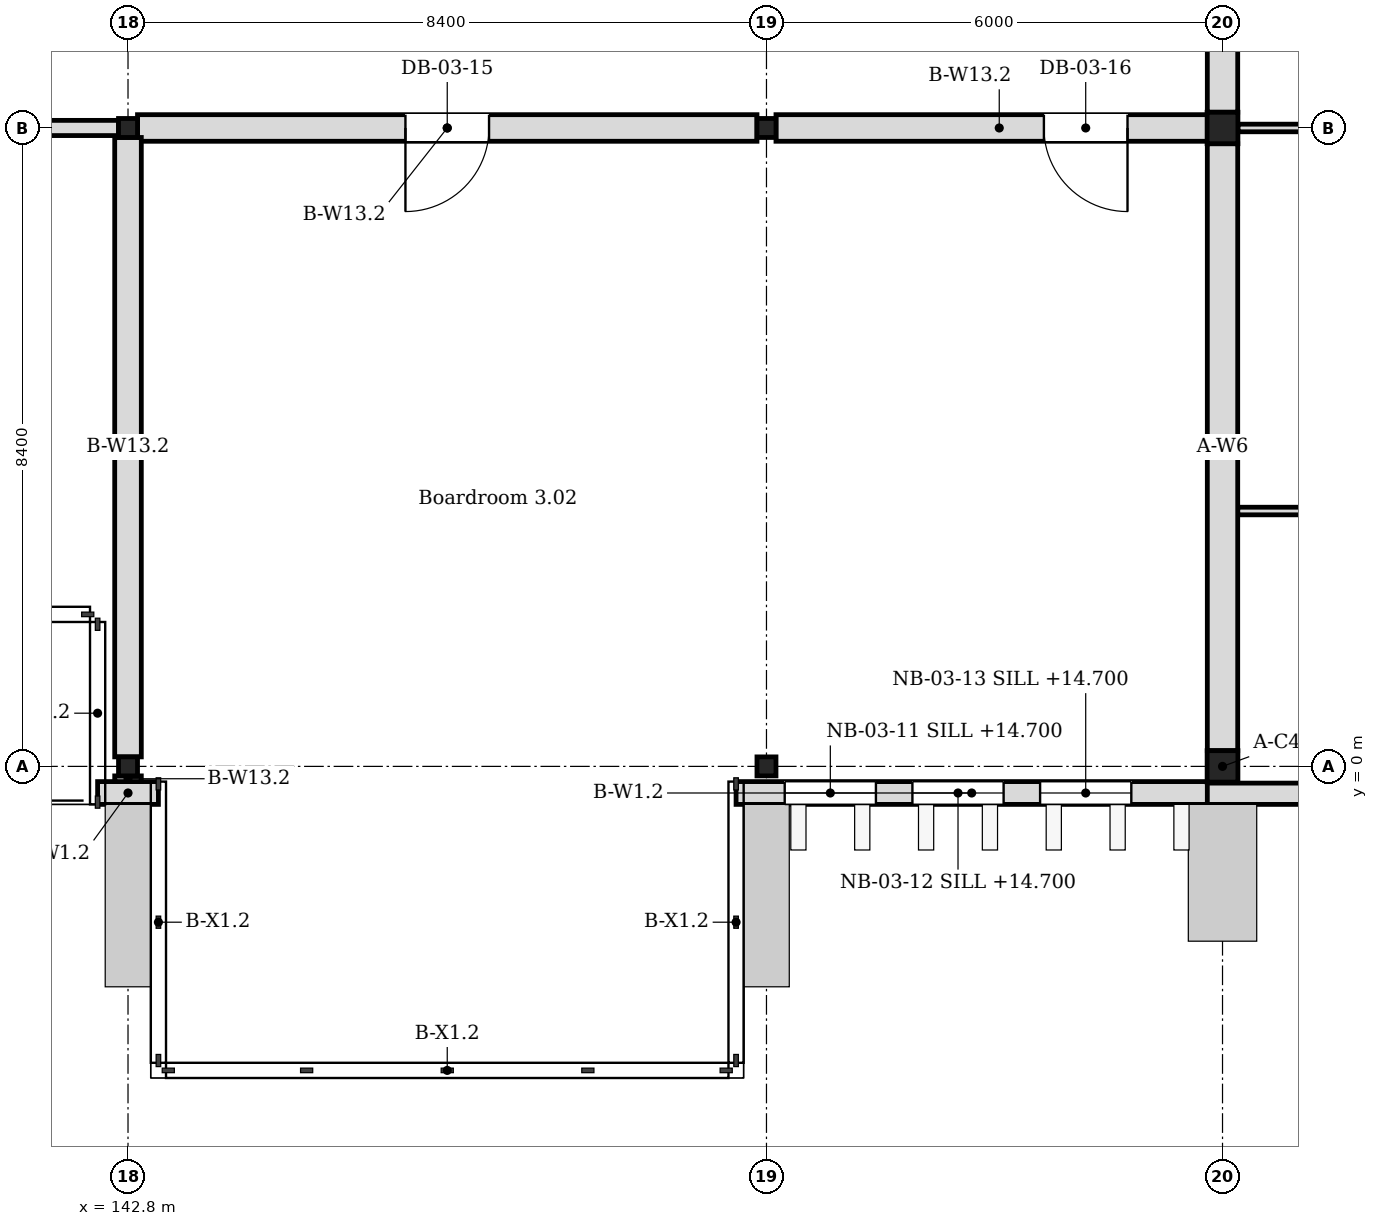
"""IFC4 building model, lengths in metres.
Left out: names, types, materials, properties, quantities, classifications, styles, units other than length and angle.
Written with IfcOpenShell. Run it as: python <this file> out.ifc"""

import sys

from ifc_helpers import new_model, si_unit, direction, frame, frame_2d, origin, origin_2d, place, context, subcontext, project, spatial, rectangle, i_section, extrude, element, fill, save


model = new_model("IFC4")
c1 = context("Model", 3, precision=1e-05, world=origin(), true_north=direction((0.0, 1.0)))
c2 = subcontext(c1, "Body", "Model", "MODEL_VIEW")
j1 = project(units=[si_unit("LENGTHUNIT", "METRE"), si_unit("PLANEANGLEUNIT", "RADIAN")], contexts=[c1])
p1 = place(None, origin())
s1 = spatial("IfcSite", under=j1, at=p1, CompositionType="ELEMENT")
p2 = place(p1, origin())
s2 = spatial("IfcBuilding", under=s1, at=p2, CompositionType="ELEMENT")
p3 = place(p2, frame((0.0, 0.0, 14.4)))
s3 = spatial("IfcBuildingStorey", under=s2, at=p3, CompositionType="ELEMENT", Elevation=14.4)
for number, where, z_axis, x_axis in (
    (1, (157.2, 0.0, 0.0), (0.0, 0.0, 1.0), (1.0, 0.0, 0.0)),
    (2, (157.2, 8.4, 0.0), (0.0, 0.0, 1.0), (1.0, 0.0, 0.0)),
):
    element("IfcColumn", number, at=place(p3, frame(where, z_axis=z_axis, x_axis=x_axis)), inside=s3, PredefinedType="COLUMN", context=c2, shape_type="SweptSolid", body=[
        extrude(i_section(OverallWidth=0.405, OverallDepth=0.414, WebThickness=0.018, FlangeThickness=0.028, FilletRadius=0.022, at=origin_2d()), origin(), (0.0, 0.0, 1.0), 4.2),
    ])
for number, where, z_axis, x_axis in (
    (3, (142.8, 0.0, 0.0), (0.0, 0.0, 1.0), (1.0, 0.0, 0.0)),
    (4, (142.8, 8.4, 0.0), (0.0, 0.0, 1.0), (1.0, 0.0, 0.0)),
    (5, (151.2, 0.0, 0.0), (0.0, 0.0, 1.0), (1.0, 0.0, 0.0)),
    (6, (151.2, 8.4, 0.0), (0.0, 0.0, 1.0), (1.0, 0.0, 0.0)),
):
    element("IfcColumn", number, at=place(p3, frame(where, z_axis=z_axis, x_axis=x_axis)), inside=s3, PredefinedType="COLUMN", context=c2, shape_type="SweptSolid", body=[
        extrude(i_section(OverallWidth=0.25, OverallDepth=0.25, WebThickness=0.009, FlangeThickness=0.014, FilletRadius=0.013, at=origin_2d()), origin(), (0.0, 0.0, 1.0), 3.95),
    ])
p4 = place(p3, frame((156.7, -0.36, 0.0), z_axis=(0.0, 0.0, 1.0), x_axis=(1.0, 0.0, 0.0)))
e7 = element("IfcWall", 7, at=p4, inside=s3, PredefinedType="SOLIDWALL", context=c2, shape_type="SweptSolid", body=[
    extrude(rectangle(XDim=20.2, YDim=0.28, at=frame_2d((10.1, 0.0))), origin(), (0.0, 0.0, 1.0), 4.05),
])
p5 = place(p4, frame((9.26, 0.0, 0.6)))
e8 = element("IfcOpeningElement", 8, at=p5, cuts=e7, PredefinedType="OPENING", context=c2, shape_type="SweptSolid", body=[
    extrude(rectangle(XDim=1.68, YDim=2.4, at=frame_2d((0.84, 1.2))), frame((0.0, 0.15, 0.0), z_axis=(0.0, -1.0, 0.0), x_axis=(1.0, 0.0, 0.0)), (0.0, 0.0, 1.0), 0.3),
])
p6 = place(p4, frame((3.34, 0.0, 0.6)))
e9 = element("IfcOpeningElement", 9, at=p6, cuts=e7, PredefinedType="OPENING", context=c2, shape_type="SweptSolid", body=[
    extrude(rectangle(XDim=2.52, YDim=2.4, at=frame_2d((1.26, 1.2))), frame((0.0, 0.15, 0.0), z_axis=(0.0, -1.0, 0.0), x_axis=(1.0, 0.0, 0.0)), (0.0, 0.0, 1.0), 0.3),
])
p7 = place(p3, frame((142.4, -0.35, 0.0), z_axis=(0.0, 0.0, 1.0), x_axis=(1.0, 0.0, 0.0)))
e10 = element("IfcWall", 10, at=p7, inside=s3, PredefinedType="SOLIDWALL", context=c2, shape_type="SweptSolid", body=[
    extrude(rectangle(XDim=0.8, YDim=0.3, at=frame_2d((0.4, 0.0))), origin(), (0.0, 0.0, 1.0), 3.95),
])
p8 = place(p3, frame((150.8, -0.35, 0.0), z_axis=(0.0, 0.0, 1.0), x_axis=(1.0, 0.0, 0.0)))
e11 = element("IfcWall", 11, at=p8, inside=s3, PredefinedType="SOLIDWALL", context=c2, shape_type="SweptSolid", body=[
    extrude(rectangle(XDim=6.2, YDim=0.3, at=frame_2d((3.1, 0.0))), origin(), (0.0, 0.0, 1.0), 3.95),
])
p9 = place(p8, frame((0.64, 0.0, 0.3)))
e12 = element("IfcOpeningElement", 12, at=p9, cuts=e11, PredefinedType="OPENING", context=c2, shape_type="SweptSolid", body=[
    extrude(rectangle(XDim=1.2, YDim=3.3, at=frame_2d((0.6, 1.65))), frame((0.0, 0.16, 0.0), z_axis=(0.0, -1.0, 0.0), x_axis=(1.0, 0.0, 0.0)), (0.0, 0.0, 1.0), 0.32),
])
p10 = place(p8, frame((2.32, 0.0, 0.3)))
e13 = element("IfcOpeningElement", 13, at=p10, cuts=e11, PredefinedType="OPENING", context=c2, shape_type="SweptSolid", body=[
    extrude(rectangle(XDim=1.2, YDim=3.3, at=frame_2d((0.6, 1.65))), frame((0.0, 0.16, 0.0), z_axis=(0.0, -1.0, 0.0), x_axis=(1.0, 0.0, 0.0)), (0.0, 0.0, 1.0), 0.32),
])
p11 = place(p8, frame((4.0, 0.0, 0.3)))
e14 = element("IfcOpeningElement", 14, at=p11, cuts=e11, PredefinedType="OPENING", context=c2, shape_type="SweptSolid", body=[
    extrude(rectangle(XDim=1.2, YDim=3.3, at=frame_2d((0.6, 1.65))), frame((0.0, 0.16, 0.0), z_axis=(0.0, -1.0, 0.0), x_axis=(1.0, 0.0, 0.0)), (0.0, 0.0, 1.0), 0.32),
])
p12 = place(p3, frame((157.403, 8.4, 0.0), z_axis=(0.0, 0.0, 1.0), x_axis=(1.0, 0.0, 0.0)))
e15 = element("IfcWall", 15, at=p12, inside=s3, PredefinedType="PARTITIONING", context=c2, shape_type="SweptSolid", body=[
    extrude(rectangle(XDim=7.995, YDim=0.1, at=frame_2d((3.998, 0.0))), origin(), (0.0, 0.0, 1.0), 3.604),
])
p13 = place(p3, frame((157.4, 3.36, 0.0), z_axis=(0.0, 0.0, 1.0), x_axis=(1.0, 0.0, 0.0)))
e16 = element("IfcWall", 16, at=p13, inside=s3, PredefinedType="PARTITIONING", context=c2, shape_type="SweptSolid", body=[
    extrude(rectangle(XDim=8.1, YDim=0.1, at=frame_2d((4.05, 0.0))), origin(), (0.0, 0.0, 1.0), 3.604),
])
for number, where, z_axis, x_axis in (
    (17, (157.2, 0.207, 0.0), (0.0, 0.0, 1.0), (0.0, 1.0, 0.0)),
    (18, (157.2, 8.607, 0.0), (0.0, 0.0, 1.0), (0.0, 1.0, 0.0)),
):
    element("IfcWall", number, at=place(p3, frame(where, z_axis=z_axis, x_axis=x_axis)), inside=s3, PredefinedType="SOLIDWALL", context=c2, shape_type="SweptSolid", body=[
        extrude(rectangle(XDim=7.986, YDim=0.4, at=frame_2d((3.993, 0.0))), origin(), (0.0, 0.0, 1.0), 3.45),
    ])
p14 = place(p3, frame((134.525, 8.4, 0.0), z_axis=(0.0, 0.0, 1.0), x_axis=(1.0, 0.0, 0.0)))
e19 = element("IfcWall", 19, at=p14, inside=s3, PredefinedType="PARTITIONING", context=c2, shape_type="SweptSolid", body=[
    extrude(rectangle(XDim=8.15, YDim=0.2, at=frame_2d((4.075, 0.0))), origin(), (0.0, 0.0, 1.0), 3.25),
])
p15 = place(p14, frame((2.875, 0.0, 0.0)))
e20 = element("IfcOpeningElement", 20, at=p15, cuts=e19, PredefinedType="OPENING", context=c2, shape_type="SweptSolid", body=[
    extrude(rectangle(XDim=2.4, YDim=2.2, at=frame_2d((1.2, 1.1))), frame((0.0, 0.11, 0.0), z_axis=(0.0, -1.0, 0.0), x_axis=(1.0, 0.0, 0.0)), (0.0, 0.0, 1.0), 0.22),
])
p16 = place(p3, frame((142.925, 8.4, 0.0), z_axis=(0.0, 0.0, 1.0), x_axis=(1.0, 0.0, 0.0)))
e21 = element("IfcWall", 21, at=p16, inside=s3, PredefinedType="PARTITIONING", context=c2, shape_type="SweptSolid", body=[
    extrude(rectangle(XDim=8.15, YDim=0.35, at=frame_2d((4.075, 0.0))), origin(), (0.0, 0.0, 1.0), 3.25),
])
p17 = place(p16, frame((3.525, 0.0, 0.0)))
e22 = element("IfcOpeningElement", 22, at=p17, cuts=e21, PredefinedType="OPENING", context=c2, shape_type="SweptSolid", body=[
    extrude(rectangle(XDim=1.1, YDim=2.4, at=frame_2d((0.55, 1.2))), frame((0.0, 0.185, 0.0), z_axis=(0.0, -1.0, 0.0), x_axis=(1.0, 0.0, 0.0)), (0.0, 0.0, 1.0), 0.37),
])
p18 = place(p3, frame((151.325, 8.4, 0.0), z_axis=(0.0, 0.0, 1.0), x_axis=(1.0, 0.0, 0.0)))
e23 = element("IfcWall", 23, at=p18, inside=s3, PredefinedType="PARTITIONING", context=c2, shape_type="SweptSolid", body=[
    extrude(rectangle(XDim=5.875, YDim=0.35, at=frame_2d((2.938, 0.0))), origin(), (0.0, 0.0, 1.0), 3.25),
])
p19 = place(p18, frame((3.525, 0.0, 0.0)))
e24 = element("IfcOpeningElement", 24, at=p19, cuts=e23, PredefinedType="OPENING", context=c2, shape_type="SweptSolid", body=[
    extrude(rectangle(XDim=1.1, YDim=2.4, at=frame_2d((0.55, 1.2))), frame((0.0, 0.185, 0.0), z_axis=(0.0, -1.0, 0.0), x_axis=(1.0, 0.0, 0.0)), (0.0, 0.0, 1.0), 0.37),
])
p20 = place(p3, frame((142.8, -0.2, 0.0), z_axis=(0.0, 0.0, 1.0), x_axis=(0.0, 1.0, 0.0)))
e25 = element("IfcWall", 25, at=p20, inside=s3, PredefinedType="PARTITIONING", context=c2, shape_type="SweptSolid", body=[
    extrude(rectangle(XDim=0.075, YDim=0.35, at=frame_2d((0.038, 0.0))), origin(), (0.0, 0.0, 1.0), 3.25),
])
p21 = place(p3, frame((142.8, 0.125, 0.0), z_axis=(0.0, 0.0, 1.0), x_axis=(0.0, 1.0, 0.0)))
e26 = element("IfcWall", 26, at=p21, inside=s3, PredefinedType="PARTITIONING", context=c2, shape_type="SweptSolid", body=[
    extrude(rectangle(XDim=8.15, YDim=0.35, at=frame_2d((4.075, 0.0))), origin(), (0.0, 0.0, 1.0), 3.25),
])
p22 = place(p9, origin())
e27 = element("IfcWindow", 27, at=p22, inside=s3, PartitioningType="TRIPLE_PANEL_VERTICAL", PredefinedType="WINDOW", context=c2, shape_type="SweptSolid", body=[
    extrude(rectangle(XDim=1.2, YDim=3.3, at=frame_2d((0.6, 1.65))), frame((0.0, 0.03, 0.0), z_axis=(0.0, -1.0, 0.0), x_axis=(1.0, 0.0, 0.0)), (0.0, 0.0, 1.0), 0.06),
])
fill(e12, e27)
p23 = place(p10, origin())
e28 = element("IfcWindow", 28, at=p23, inside=s3, PartitioningType="TRIPLE_PANEL_VERTICAL", PredefinedType="WINDOW", context=c2, shape_type="SweptSolid", body=[
    extrude(rectangle(XDim=1.2, YDim=3.3, at=frame_2d((0.6, 1.65))), frame((0.0, 0.03, 0.0), z_axis=(0.0, -1.0, 0.0), x_axis=(1.0, 0.0, 0.0)), (0.0, 0.0, 1.0), 0.06),
])
fill(e13, e28)
p24 = place(p11, origin())
e29 = element("IfcWindow", 29, at=p24, inside=s3, PartitioningType="TRIPLE_PANEL_VERTICAL", PredefinedType="WINDOW", context=c2, shape_type="SweptSolid", body=[
    extrude(rectangle(XDim=1.2, YDim=3.3, at=frame_2d((0.6, 1.65))), frame((0.0, 0.03, 0.0), z_axis=(0.0, -1.0, 0.0), x_axis=(1.0, 0.0, 0.0)), (0.0, 0.0, 1.0), 0.06),
])
fill(e14, e29)
p25 = place(p17, origin())
e30 = element("IfcDoor", 30, at=p25, inside=s3, OperationType="SINGLE_SWING_LEFT", PredefinedType="DOOR", context=c2, shape_type="SweptSolid", body=[
    extrude(rectangle(XDim=1.1, YDim=2.4, at=frame_2d((0.55, 1.2))), frame((0.0, 0.025, 0.0), z_axis=(0.0, -1.0, 0.0), x_axis=(1.0, 0.0, 0.0)), (0.0, 0.0, 1.0), 0.05),
])
fill(e22, e30)
p26 = place(p19, origin())
e31 = element("IfcDoor", 31, at=p26, inside=s3, OperationType="SINGLE_SWING_LEFT", PredefinedType="DOOR", context=c2, shape_type="SweptSolid", body=[
    extrude(rectangle(XDim=1.1, YDim=2.4, at=frame_2d((0.55, 1.2))), frame((0.0, 0.025, 0.0), z_axis=(0.0, -1.0, 0.0), x_axis=(1.0, 0.0, 0.0)), (0.0, 0.0, 1.0), 0.05),
])
fill(e24, e31)
save(model, sys.argv[1])
